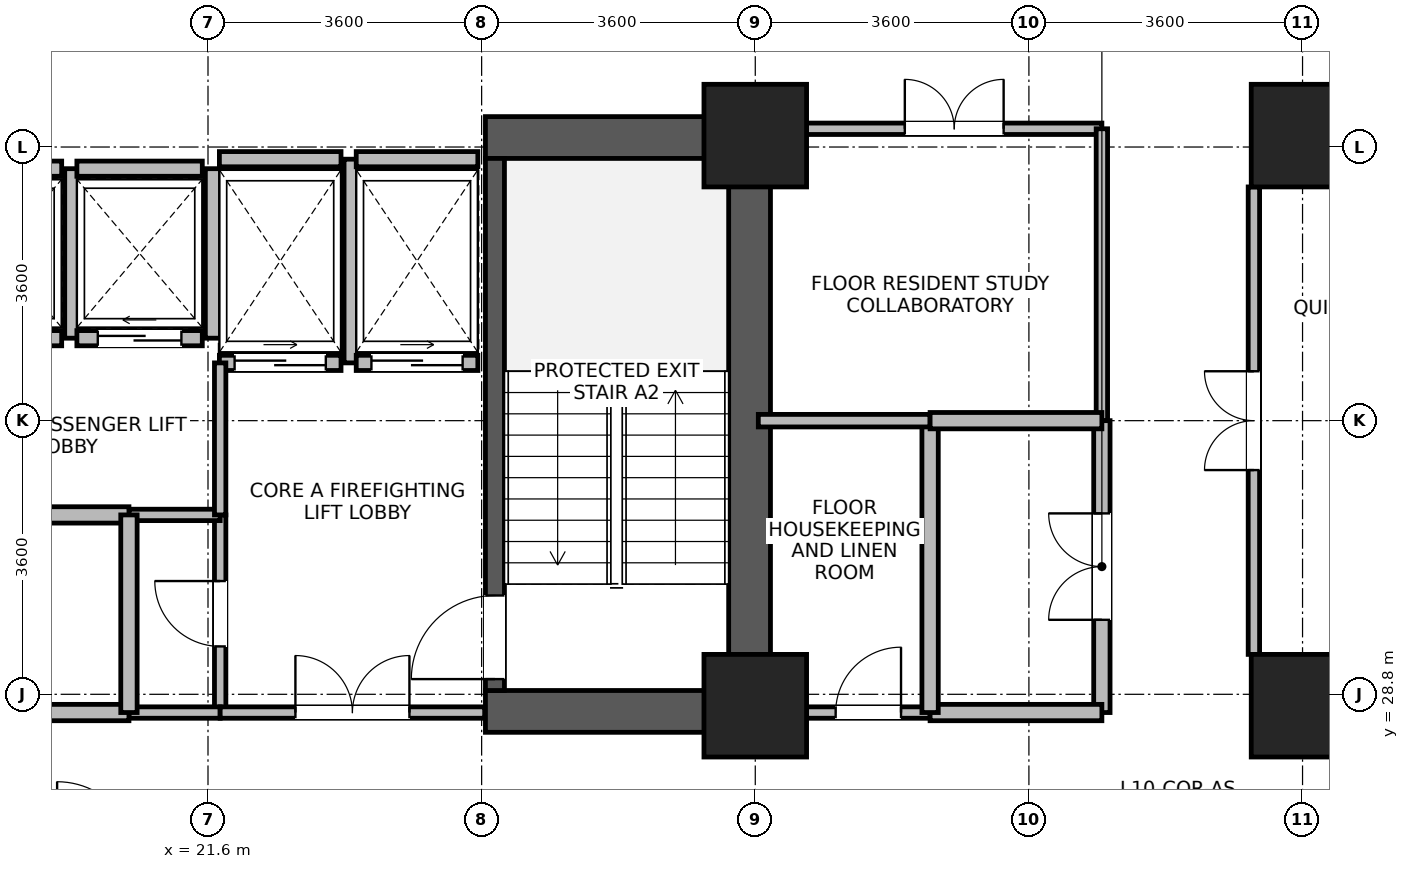
"""IFC4 building model, lengths in metres.
Left out: names, types, materials, properties, quantities, classifications, styles, units other than length and angle.
Written with IfcOpenShell. Run it as: python <this file> out.ifc"""

import sys

from ifc_helpers import new_model, si_unit, direction, frame, frame_2d, origin, origin_2d, place, context, subcontext, project, spatial, rectangle, extrude, source, transform, mapped, element, fill, save


model = new_model("IFC4")
c1 = context("Model", 3, precision=1e-05, world=origin(), true_north=direction((0.0, 1.0)))
c2 = subcontext(c1, "Body", "Model", "MODEL_VIEW")
j1 = project(units=[si_unit("LENGTHUNIT", "METRE"), si_unit("PLANEANGLEUNIT", "RADIAN")], contexts=[c1])
p1 = place(None, origin())
s1 = spatial("IfcSite", under=j1, at=p1, CompositionType="ELEMENT")
p2 = place(p1, origin())
s2 = spatial("IfcBuilding", under=s1, at=p2, CompositionType="ELEMENT")
p3 = place(p2, frame((0.0, 0.0, 43.8)))
s3 = spatial("IfcBuildingStorey", under=s2, at=p3, CompositionType="ELEMENT", Elevation=43.8)
p4 = place(p3, frame((28.725, 28.3, 0.0), z_axis=(0.0, 0.0, 1.0), x_axis=(0.0, 1.0, 0.0)))
e1 = element("IfcWall", 1, at=p4, inside=s3, PredefinedType="SHEAR", context=c2, shape_type="SweptSolid", body=[
    extrude(rectangle(XDim=8.1, YDim=0.55, at=frame_2d((4.05, 0.0))), origin(), (0.0, 0.0, 1.0), 3.45),
])
for number, where, z_axis, x_axis in (
    (2, (25.25, 28.575, 0.0), (0.0, 0.0, 1.0), (1.0, 0.0, 0.0)),
    (3, (25.25, 36.125, 0.0), (0.0, 0.0, 1.0), (1.0, 0.0, 0.0)),
):
    element("IfcWall", number, at=place(p3, frame(where, z_axis=z_axis, x_axis=x_axis)), inside=s3, PredefinedType="SHEAR", context=c2, shape_type="SweptSolid", body=[
        extrude(rectangle(XDim=3.2, YDim=0.55, at=frame_2d((1.6, 0.0))), origin(), (0.0, 0.0, 1.0), 3.45),
    ])
p5 = place(p3, frame((25.375, 28.85, 0.0), z_axis=(0.0, 0.0, 1.0), x_axis=(0.0, 1.0, 0.0)))
e4 = element("IfcWall", 4, at=p5, inside=s3, PredefinedType="SHEAR", context=c2, shape_type="SweptSolid", body=[
    extrude(rectangle(XDim=7.0, YDim=0.25, at=frame_2d((3.5, 0.0))), origin(), (0.0, 0.0, 1.0), 3.45),
])
p6 = place(p5, frame((0.15, 0.0, 0.0)))
e5 = element("IfcOpeningElement", 5, at=p6, cuts=e4, PredefinedType="OPENING", context=c2, shape_type="SweptSolid", body=[
    extrude(rectangle(XDim=1.1, YDim=2.08, at=frame_2d((0.55, 1.04))), frame((0.0, 0.135, 0.0), z_axis=(0.0, -1.0, 0.0), x_axis=(1.0, 0.0, 0.0)), (0.0, 0.0, 1.0), 0.27),
])
m1 = source(origin(), c2, "Body", "SweptSolid", [
    extrude(rectangle(XDim=1.35, YDim=1.35, at=origin_2d()), origin(), (0.0, 0.0, 1.0), 3.7),
])
for number, where, z_axis, x_axis in (
    (6, (28.8, 28.65, 0.0), (0.0, 0.0, 1.0), (1.0, 0.0, 0.0)),
    (7, (28.8, 36.15, 0.0), (0.0, 0.0, 1.0), (1.0, 0.0, 0.0)),
    (8, (36.0, 28.65, 0.0), (0.0, 0.0, 1.0), (1.0, 0.0, 0.0)),
    (9, (36.0, 36.15, 0.0), (0.0, 0.0, 1.0), (1.0, 0.0, 0.0)),
):
    element("IfcColumn", number, at=place(p3, frame(where, z_axis=z_axis, x_axis=x_axis)), inside=s3, PredefinedType="COLUMN", context=c2, shape_type="MappedRepresentation", body=[
        mapped(m1, transform((0.0, 0.0, 0.0), x_axis=(1.0, 0.0, 0.0), y_axis=(0.0, 1.0, 0.0), z_axis=(0.0, 0.0, 1.0), scale=1.0)),
    ])
p7 = place(p3, frame((18.025, 33.485, 0.0), z_axis=(0.0, 0.0, 1.0), x_axis=(1.0, 0.0, 0.0)))
e10 = element("IfcWall", 10, at=p7, inside=s3, PredefinedType="PARTITIONING", context=c2, shape_type="SweptSolid", body=[
    extrude(rectangle(XDim=1.65, YDim=0.2, at=frame_2d((0.825, 0.0))), origin(), (0.0, 0.0, 1.0), 3.43),
])
p8 = place(p7, frame((0.275, 0.0, 0.0)))
e11 = element("IfcOpeningElement", 11, at=p8, cuts=e10, PredefinedType="OPENING", context=c2, shape_type="SweptSolid", body=[
    extrude(rectangle(XDim=1.1, YDim=2.12, at=frame_2d((0.55, 1.06))), frame((0.0, 0.11, 0.0), z_axis=(0.0, -1.0, 0.0), x_axis=(1.0, 0.0, 0.0)), (0.0, 0.0, 1.0), 0.22),
])
p9 = place(p3, frame((18.025, 35.715, 0.0), z_axis=(0.0, 0.0, 1.0), x_axis=(1.0, 0.0, 0.0)))
e12 = element("IfcWall", 12, at=p9, inside=s3, PredefinedType="PARTITIONING", context=c2, shape_type="SweptSolid", body=[
    extrude(rectangle(XDim=1.65, YDim=0.2, at=frame_2d((0.825, 0.0))), origin(), (0.0, 0.0, 1.0), 2.23),
])
p10 = place(p3, frame((19.815, 33.485, 0.0), z_axis=(0.0, 0.0, 1.0), x_axis=(0.0, 1.0, 0.0)))
e13 = element("IfcWall", 13, at=p10, inside=s3, PredefinedType="PARTITIONING", context=c2, shape_type="SweptSolid", body=[
    extrude(rectangle(XDim=2.23, YDim=0.2, at=frame_2d((1.115, 0.0))), origin(), (0.0, 0.0, 1.0), 3.43),
])
p11 = place(p3, frame((19.875, 33.485, 0.0), z_axis=(0.0, 0.0, 1.0), x_axis=(1.0, 0.0, 0.0)))
e14 = element("IfcWall", 14, at=p11, inside=s3, PredefinedType="PARTITIONING", context=c2, shape_type="SweptSolid", body=[
    extrude(rectangle(XDim=1.65, YDim=0.2, at=frame_2d((0.825, 0.0))), origin(), (0.0, 0.0, 1.0), 3.43),
])
p12 = place(p11, frame((0.275, 0.0, 0.0)))
e15 = element("IfcOpeningElement", 15, at=p12, cuts=e14, PredefinedType="OPENING", context=c2, shape_type="SweptSolid", body=[
    extrude(rectangle(XDim=1.1, YDim=2.12, at=frame_2d((0.55, 1.06))), frame((0.0, 0.11, 0.0), z_axis=(0.0, -1.0, 0.0), x_axis=(1.0, 0.0, 0.0)), (0.0, 0.0, 1.0), 0.22),
])
p13 = place(p3, frame((19.875, 35.715, 0.0), z_axis=(0.0, 0.0, 1.0), x_axis=(1.0, 0.0, 0.0)))
e16 = element("IfcWall", 16, at=p13, inside=s3, PredefinedType="PARTITIONING", context=c2, shape_type="SweptSolid", body=[
    extrude(rectangle(XDim=1.65, YDim=0.2, at=frame_2d((0.825, 0.0))), origin(), (0.0, 0.0, 1.0), 2.23),
])
p14 = place(p3, frame((21.665, 33.485, 0.0), z_axis=(0.0, 0.0, 1.0), x_axis=(0.0, 1.0, 0.0)))
e17 = element("IfcWall", 17, at=p14, inside=s3, PredefinedType="PARTITIONING", context=c2, shape_type="SweptSolid", body=[
    extrude(rectangle(XDim=2.23, YDim=0.2, at=frame_2d((1.115, 0.0))), origin(), (0.0, 0.0, 1.0), 3.43),
])
p15 = place(p3, frame((21.75, 33.16, 0.0), z_axis=(0.0, 0.0, 1.0), x_axis=(1.0, 0.0, 0.0)))
e18 = element("IfcWall", 18, at=p15, inside=s3, PredefinedType="PARTITIONING", context=c2, shape_type="SweptSolid", body=[
    extrude(rectangle(XDim=1.6, YDim=0.2, at=frame_2d((0.8, 0.0))), origin(), (0.0, 0.0, 1.0), 3.43),
])
p16 = place(p15, frame((0.2, 0.0, 0.0)))
e19 = element("IfcOpeningElement", 19, at=p16, cuts=e18, PredefinedType="OPENING", context=c2, shape_type="SweptSolid", body=[
    extrude(rectangle(XDim=1.2, YDim=2.12, at=frame_2d((0.6, 1.06))), frame((0.0, 0.11, 0.0), z_axis=(0.0, -1.0, 0.0), x_axis=(1.0, 0.0, 0.0)), (0.0, 0.0, 1.0), 0.22),
])
p17 = place(p3, frame((21.75, 35.84, 0.0), z_axis=(0.0, 0.0, 1.0), x_axis=(1.0, 0.0, 0.0)))
e20 = element("IfcWall", 20, at=p17, inside=s3, PredefinedType="PARTITIONING", context=c2, shape_type="SweptSolid", body=[
    extrude(rectangle(XDim=1.6, YDim=0.2, at=frame_2d((0.8, 0.0))), origin(), (0.0, 0.0, 1.0), 2.23),
])
p18 = place(p3, frame((23.49, 33.16, 0.0), z_axis=(0.0, 0.0, 1.0), x_axis=(0.0, 1.0, 0.0)))
e21 = element("IfcWall", 21, at=p18, inside=s3, PredefinedType="PARTITIONING", context=c2, shape_type="SweptSolid", body=[
    extrude(rectangle(XDim=2.68, YDim=0.2, at=frame_2d((1.34, 0.0))), origin(), (0.0, 0.0, 1.0), 3.43),
])
p19 = place(p3, frame((23.55, 33.16, 0.0), z_axis=(0.0, 0.0, 1.0), x_axis=(1.0, 0.0, 0.0)))
e22 = element("IfcWall", 22, at=p19, inside=s3, PredefinedType="PARTITIONING", context=c2, shape_type="SweptSolid", body=[
    extrude(rectangle(XDim=1.6, YDim=0.2, at=frame_2d((0.8, 0.0))), origin(), (0.0, 0.0, 1.0), 3.43),
])
p20 = place(p19, frame((0.2, 0.0, 0.0)))
e23 = element("IfcOpeningElement", 23, at=p20, cuts=e22, PredefinedType="OPENING", context=c2, shape_type="SweptSolid", body=[
    extrude(rectangle(XDim=1.2, YDim=2.12, at=frame_2d((0.6, 1.06))), frame((0.0, 0.11, 0.0), z_axis=(0.0, -1.0, 0.0), x_axis=(1.0, 0.0, 0.0)), (0.0, 0.0, 1.0), 0.22),
])
p21 = place(p3, frame((23.55, 35.84, 0.0), z_axis=(0.0, 0.0, 1.0), x_axis=(1.0, 0.0, 0.0)))
e24 = element("IfcWall", 24, at=p21, inside=s3, PredefinedType="PARTITIONING", context=c2, shape_type="SweptSolid", body=[
    extrude(rectangle(XDim=1.6, YDim=0.2, at=frame_2d((0.8, 0.0))), origin(), (0.0, 0.0, 1.0), 2.23),
])
p22 = place(p3, frame((35.36, 29.325, 0.0), z_axis=(0.0, 0.0, 1.0), x_axis=(0.0, 1.0, 0.0)))
e25 = element("IfcWall", 25, at=p22, inside=s3, PredefinedType="PARTITIONING", context=c2, shape_type="SweptSolid", body=[
    extrude(rectangle(XDim=6.15, YDim=0.15, at=frame_2d((3.075, 0.0))), origin(), (0.0, 0.0, 1.0), 3.43),
])
p23 = place(p22, frame((2.425, 0.0, 0.0)))
e26 = element("IfcOpeningElement", 26, at=p23, cuts=e25, PredefinedType="OPENING", context=c2, shape_type="SweptSolid", body=[
    extrude(rectangle(XDim=1.3, YDim=2.12, at=frame_2d((0.65, 1.06))), frame((0.0, 0.085, 0.0), z_axis=(0.0, -1.0, 0.0), x_axis=(1.0, 0.0, 0.0)), (0.0, 0.0, 1.0), 0.17),
])
p24 = place(p3, frame((29.475, 36.24, 0.0), z_axis=(0.0, 0.0, 1.0), x_axis=(1.0, 0.0, 0.0)))
e27 = element("IfcWall", 27, at=p24, inside=s3, PredefinedType="PARTITIONING", context=c2, shape_type="SweptSolid", body=[
    extrude(rectangle(XDim=3.885, YDim=0.15, at=frame_2d((1.942, 0.0))), origin(), (0.0, 0.0, 1.0), 2.78),
])
p25 = place(p24, frame((1.292, 0.0, 0.0)))
e28 = element("IfcOpeningElement", 28, at=p25, cuts=e27, PredefinedType="OPENING", context=c2, shape_type="SweptSolid", body=[
    extrude(rectangle(XDim=1.3, YDim=2.12, at=frame_2d((0.65, 1.06))), frame((0.0, 0.085, 0.0), z_axis=(0.0, -1.0, 0.0), x_axis=(1.0, 0.0, 0.0)), (0.0, 0.0, 1.0), 0.17),
])
p26 = place(p3, frame((33.36, 32.4, 0.0), z_axis=(0.0, 0.0, 1.0), x_axis=(0.0, 1.0, 0.0)))
e29 = element("IfcWall", 29, at=p26, inside=s3, PredefinedType="PARTITIONING", context=c2, shape_type="SweptSolid", body=[
    extrude(rectangle(XDim=3.84, YDim=0.15, at=frame_2d((1.92, 0.0))), origin(), (0.0, 0.0, 1.0), 3.43),
])
p27 = place(p3, frame((33.36, 28.56, 0.0), z_axis=(0.0, 0.0, 1.0), x_axis=(0.0, 1.0, 0.0)))
e30 = element("IfcWall", 30, at=p27, inside=s3, PredefinedType="PARTITIONING", context=c2, shape_type="SweptSolid", body=[
    extrude(rectangle(XDim=3.84, YDim=0.215, at=frame_2d((1.92, 0.0))), origin(), (0.0, 0.0, 1.0), 3.43),
])
p28 = place(p27, frame((1.22, 0.0, 0.0)))
e31 = element("IfcOpeningElement", 31, at=p28, cuts=e30, PredefinedType="OPENING", context=c2, shape_type="SweptSolid", body=[
    extrude(rectangle(XDim=1.4, YDim=2.15, at=frame_2d((0.7, 1.075))), frame((0.0, 0.118, 0.0), z_axis=(0.0, -1.0, 0.0), x_axis=(1.0, 0.0, 0.0)), (0.0, 0.0, 1.0), 0.235),
])
p29 = place(p3, frame((21.76, 28.56, 0.0), z_axis=(0.0, 0.0, 1.0), x_axis=(0.0, 1.0, 0.0)))
e32 = element("IfcWall", 32, at=p29, inside=s3, PredefinedType="PARTITIONING", context=c2, shape_type="SweptSolid", body=[
    extrude(rectangle(XDim=2.6, YDim=0.15, at=frame_2d((1.3, 0.0))), origin(), (0.0, 0.0, 1.0), 3.43),
])
p30 = place(p29, frame((0.87, 0.0, 0.0)))
e33 = element("IfcOpeningElement", 33, at=p30, cuts=e32, PredefinedType="OPENING", context=c2, shape_type="SweptSolid", body=[
    extrude(rectangle(XDim=0.86, YDim=2.02, at=frame_2d((0.43, 1.01))), frame((0.0, 0.085, 0.0), z_axis=(0.0, -1.0, 0.0), x_axis=(1.0, 0.0, 0.0)), (0.0, 0.0, 1.0), 0.17),
])
p31 = place(p3, frame((29.475, 28.56, 0.0), z_axis=(0.0, 0.0, 1.0), x_axis=(1.0, 0.0, 0.0)))
e34 = element("IfcWall", 34, at=p31, inside=s3, PredefinedType="PARTITIONING", context=c2, shape_type="SweptSolid", body=[
    extrude(rectangle(XDim=1.625, YDim=0.15, at=frame_2d((0.812, 0.0))), origin(), (0.0, 0.0, 1.0), 2.78),
])
p32 = place(p31, frame((0.383, 0.0, 0.0)))
e35 = element("IfcOpeningElement", 35, at=p32, cuts=e34, PredefinedType="OPENING", context=c2, shape_type="SweptSolid", body=[
    extrude(rectangle(XDim=0.86, YDim=2.02, at=frame_2d((0.43, 1.01))), frame((0.0, 0.085, 0.0), z_axis=(0.0, -1.0, 0.0), x_axis=(1.0, 0.0, 0.0)), (0.0, 0.0, 1.0), 0.17),
])
p33 = place(p3, frame((31.1, 28.56, 0.0), z_axis=(0.0, 0.0, 1.0), x_axis=(1.0, 0.0, 0.0)))
e36 = element("IfcWall", 36, at=p33, inside=s3, PredefinedType="PARTITIONING", context=c2, shape_type="SweptSolid", body=[
    extrude(rectangle(XDim=2.26, YDim=0.215, at=frame_2d((1.13, 0.0))), origin(), (0.0, 0.0, 1.0), 2.78),
])
p34 = place(p3, frame((20.56, 28.56, 0.0), z_axis=(0.0, 0.0, 1.0), x_axis=(1.0, 0.0, 0.0)))
e37 = element("IfcWall", 37, at=p34, inside=s3, PredefinedType="PARTITIONING", context=c2, shape_type="SweptSolid", body=[
    extrude(rectangle(XDim=1.2, YDim=0.15, at=frame_2d((0.6, 0.0))), origin(), (0.0, 0.0, 1.0), 2.23),
])
p35 = place(p3, frame((20.56, 31.16, 0.0), z_axis=(0.0, 0.0, 1.0), x_axis=(1.0, 0.0, 0.0)))
e38 = element("IfcWall", 38, at=p35, inside=s3, PredefinedType="PARTITIONING", context=c2, shape_type="SweptSolid", body=[
    extrude(rectangle(XDim=1.2, YDim=0.15, at=frame_2d((0.6, 0.0))), origin(), (0.0, 0.0, 1.0), 3.43),
])
p36 = place(p3, frame((19.36, 28.56, 0.0), z_axis=(0.0, 0.0, 1.0), x_axis=(1.0, 0.0, 0.0)))
e39 = element("IfcWall", 39, at=p36, inside=s3, PredefinedType="PARTITIONING", context=c2, shape_type="SweptSolid", body=[
    extrude(rectangle(XDim=1.2, YDim=0.215, at=frame_2d((0.6, 0.0))), origin(), (0.0, 0.0, 1.0), 2.23),
])
p37 = place(p3, frame((19.36, 31.16, 0.0), z_axis=(0.0, 0.0, 1.0), x_axis=(1.0, 0.0, 0.0)))
e40 = element("IfcWall", 40, at=p37, inside=s3, PredefinedType="PARTITIONING", context=c2, shape_type="SweptSolid", body=[
    extrude(rectangle(XDim=1.2, YDim=0.215, at=frame_2d((0.6, 0.0))), origin(), (0.0, 0.0, 1.0), 3.43),
])
p38 = place(p3, frame((31.1, 28.56, 0.0), z_axis=(0.0, 0.0, 1.0), x_axis=(0.0, 1.0, 0.0)))
e41 = element("IfcWall", 41, at=p38, inside=s3, PredefinedType="PARTITIONING", context=c2, shape_type="SweptSolid", body=[
    extrude(rectangle(XDim=3.84, YDim=0.215, at=frame_2d((1.92, 0.0))), origin(), (0.0, 0.0, 1.0), 3.43),
])
p39 = place(p3, frame((21.76, 28.56, 0.0), z_axis=(0.0, 0.0, 1.0), x_axis=(1.0, 0.0, 0.0)))
e42 = element("IfcWall", 42, at=p39, inside=s3, PredefinedType="PARTITIONING", context=c2, shape_type="SweptSolid", body=[
    extrude(rectangle(XDim=3.48, YDim=0.15, at=frame_2d((1.74, 0.0))), origin(), (0.0, 0.0, 1.0), 2.23),
])
p40 = place(p39, frame((0.99, 0.0, 0.0)))
e43 = element("IfcOpeningElement", 43, at=p40, cuts=e42, PredefinedType="OPENING", context=c2, shape_type="SweptSolid", body=[
    extrude(rectangle(XDim=1.5, YDim=2.1, at=frame_2d((0.75, 1.05))), frame((0.0, 0.085, 0.0), z_axis=(0.0, -1.0, 0.0), x_axis=(1.0, 0.0, 0.0)), (0.0, 0.0, 1.0), 0.17),
])
p41 = place(p3, frame((20.56, 28.56, 0.0), z_axis=(0.0, 0.0, 1.0), x_axis=(0.0, 1.0, 0.0)))
e44 = element("IfcWall", 44, at=p41, inside=s3, PredefinedType="PARTITIONING", context=c2, shape_type="SweptSolid", body=[
    extrude(rectangle(XDim=2.6, YDim=0.215, at=frame_2d((1.3, 0.0))), origin(), (0.0, 0.0, 1.0), 3.43),
])
p42 = place(p3, frame((28.84, 32.4, 0.0), z_axis=(0.0, 0.0, 1.0), x_axis=(1.0, 0.0, 0.0)))
e45 = element("IfcWall", 45, at=p42, inside=s3, PredefinedType="PARTITIONING", context=c2, shape_type="SweptSolid", body=[
    extrude(rectangle(XDim=2.26, YDim=0.165, at=frame_2d((1.13, 0.0))), origin(), (0.0, 0.0, 1.0), 3.43),
])
p43 = place(p3, frame((31.1, 32.4, 0.0), z_axis=(0.0, 0.0, 1.0), x_axis=(1.0, 0.0, 0.0)))
e46 = element("IfcWall", 46, at=p43, inside=s3, PredefinedType="PARTITIONING", context=c2, shape_type="SweptSolid", body=[
    extrude(rectangle(XDim=2.26, YDim=0.215, at=frame_2d((1.13, 0.0))), origin(), (0.0, 0.0, 1.0), 3.43),
])
p44 = place(p3, frame((21.76, 31.16, 0.0), z_axis=(0.0, 0.0, 1.0), x_axis=(0.0, 1.0, 0.0)))
e47 = element("IfcWall", 47, at=p44, inside=s3, PredefinedType="PARTITIONING", context=c2, shape_type="SweptSolid", body=[
    extrude(rectangle(XDim=2.0, YDim=0.15, at=frame_2d((1.0, 0.0))), origin(), (0.0, 0.0, 1.0), 3.43),
])
p45 = place(p6, origin())
e48 = element("IfcDoor", 48, at=p45, inside=s3, OperationType="SINGLE_SWING_LEFT", PredefinedType="DOOR", context=c2, shape_type="SweptSolid", body=[
    extrude(rectangle(XDim=1.1, YDim=2.08, at=frame_2d((0.55, 1.04))), frame((0.0, 0.025, 0.0), z_axis=(0.0, -1.0, 0.0), x_axis=(1.0, 0.0, 0.0)), (0.0, 0.0, 1.0), 0.05),
])
fill(e5, e48)
p46 = place(p12, origin())
e49 = element("IfcDoor", 49, at=p46, inside=s3, OperationType="SLIDING_TO_LEFT", PredefinedType="DOOR", context=c2, shape_type="SweptSolid", body=[
    extrude(rectangle(XDim=1.1, YDim=2.12, at=frame_2d((0.55, 1.06))), frame((0.0, 0.025, 0.0), z_axis=(0.0, -1.0, 0.0), x_axis=(1.0, 0.0, 0.0)), (0.0, 0.0, 1.0), 0.05),
])
fill(e15, e49)
p47 = place(p16, origin())
e50 = element("IfcDoor", 50, at=p47, inside=s3, OperationType="SLIDING_TO_RIGHT", PredefinedType="DOOR", context=c2, shape_type="SweptSolid", body=[
    extrude(rectangle(XDim=1.2, YDim=2.12, at=frame_2d((0.6, 1.06))), frame((0.0, 0.025, 0.0), z_axis=(0.0, -1.0, 0.0), x_axis=(1.0, 0.0, 0.0)), (0.0, 0.0, 1.0), 0.05),
])
fill(e19, e50)
p48 = place(p20, origin())
e51 = element("IfcDoor", 51, at=p48, inside=s3, OperationType="SLIDING_TO_RIGHT", PredefinedType="DOOR", context=c2, shape_type="SweptSolid", body=[
    extrude(rectangle(XDim=1.2, YDim=2.12, at=frame_2d((0.6, 1.06))), frame((0.0, 0.025, 0.0), z_axis=(0.0, -1.0, 0.0), x_axis=(1.0, 0.0, 0.0)), (0.0, 0.0, 1.0), 0.05),
])
fill(e23, e51)
p49 = place(p23, origin())
e52 = element("IfcDoor", 52, at=p49, inside=s3, OperationType="DOUBLE_DOOR_SINGLE_SWING", PredefinedType="DOOR", context=c2, shape_type="SweptSolid", body=[
    extrude(rectangle(XDim=1.3, YDim=2.12, at=frame_2d((0.65, 1.06))), frame((0.0, 0.025, 0.0), z_axis=(0.0, -1.0, 0.0), x_axis=(1.0, 0.0, 0.0)), (0.0, 0.0, 1.0), 0.05),
])
fill(e26, e52)
p50 = place(p25, origin())
e53 = element("IfcDoor", 53, at=p50, inside=s3, OperationType="DOUBLE_DOOR_SINGLE_SWING", PredefinedType="DOOR", context=c2, shape_type="SweptSolid", body=[
    extrude(rectangle(XDim=1.3, YDim=2.12, at=frame_2d((0.65, 1.06))), frame((0.0, 0.025, 0.0), z_axis=(0.0, -1.0, 0.0), x_axis=(1.0, 0.0, 0.0)), (0.0, 0.0, 1.0), 0.05),
])
fill(e28, e53)
p51 = place(p28, origin())
e54 = element("IfcDoor", 54, at=p51, inside=s3, OperationType="DOUBLE_DOOR_SINGLE_SWING", PredefinedType="DOOR", context=c2, shape_type="SweptSolid", body=[
    extrude(rectangle(XDim=1.4, YDim=2.15, at=frame_2d((0.7, 1.075))), frame((0.0, 0.025, 0.0), z_axis=(0.0, -1.0, 0.0), x_axis=(1.0, 0.0, 0.0)), (0.0, 0.0, 1.0), 0.05),
])
fill(e31, e54)
p52 = place(p30, origin())
e55 = element("IfcDoor", 55, at=p52, inside=s3, OperationType="SINGLE_SWING_RIGHT", PredefinedType="DOOR", context=c2, shape_type="SweptSolid", body=[
    extrude(rectangle(XDim=0.86, YDim=2.02, at=frame_2d((0.43, 1.01))), frame((0.0, 0.025, 0.0), z_axis=(0.0, -1.0, 0.0), x_axis=(1.0, 0.0, 0.0)), (0.0, 0.0, 1.0), 0.05),
])
fill(e33, e55)
p53 = place(p32, origin())
e56 = element("IfcDoor", 56, at=p53, inside=s3, OperationType="SINGLE_SWING_RIGHT", PredefinedType="DOOR", context=c2, shape_type="SweptSolid", body=[
    extrude(rectangle(XDim=0.86, YDim=2.02, at=frame_2d((0.43, 1.01))), frame((0.0, 0.025, 0.0), z_axis=(0.0, -1.0, 0.0), x_axis=(1.0, 0.0, 0.0)), (0.0, 0.0, 1.0), 0.05),
])
fill(e35, e56)
p54 = place(p40, origin())
e57 = element("IfcDoor", 57, at=p54, inside=s3, OperationType="DOUBLE_DOOR_SINGLE_SWING", PredefinedType="DOOR", context=c2, shape_type="SweptSolid", body=[
    extrude(rectangle(XDim=1.5, YDim=2.1, at=frame_2d((0.75, 1.05))), frame((0.0, 0.025, 0.0), z_axis=(0.0, -1.0, 0.0), x_axis=(1.0, 0.0, 0.0)), (0.0, 0.0, 1.0), 0.05),
])
fill(e43, e57)
save(model, sys.argv[1])
